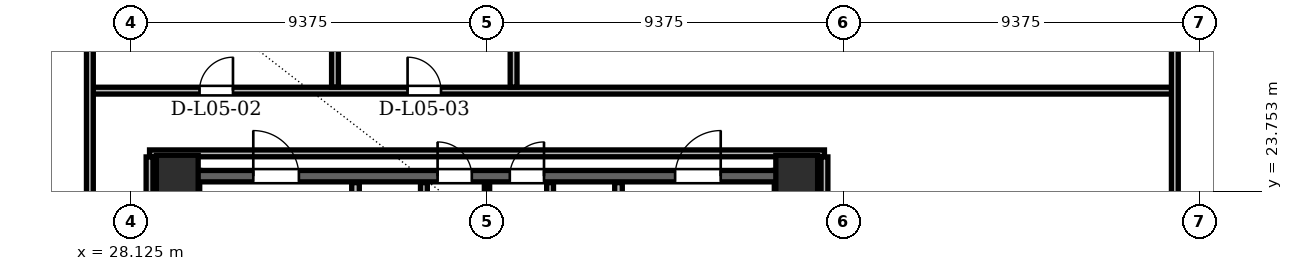
"""IFC4 building model, lengths in metres.
Left out: names, types, materials, properties, quantities, classifications, styles, units other than length and angle.
Written with IfcOpenShell. Run it as: python <this file> out.ifc"""

import sys

from ifc_helpers import new_model, si_unit, direction, frame, frame_2d, origin, origin_2d, place, context, subcontext, project, spatial, rectangle, hollow_rectangle, extrude, element, fill, save


model = new_model("IFC4")
c1 = context("Model", 3, precision=1e-05, world=origin(), true_north=direction((0.0, 1.0)))
c2 = subcontext(c1, "Body", "Model", "MODEL_VIEW")
j1 = project(units=[si_unit("LENGTHUNIT", "METRE"), si_unit("PLANEANGLEUNIT", "RADIAN")], contexts=[c1])
p1 = place(None, origin())
s1 = spatial("IfcSite", under=j1, at=p1, CompositionType="ELEMENT")
p2 = place(p1, origin())
s2 = spatial("IfcBuilding", under=s1, at=p2, CompositionType="ELEMENT")
p3 = place(p2, frame((0.0, 0.0, 22.5)))
s3 = spatial("IfcBuildingStorey", under=s2, at=p3, CompositionType="ELEMENT", Elevation=22.5)
for number, where, z_axis, x_axis in (
    (1, (45.65, 24.15, 0.0), (0.0, 0.0, 1.0), (1.0, 0.0, 0.0)),
    (2, (29.35, 24.15, 0.0), (0.0, 0.0, 1.0), (1.0, 0.0, 0.0)),
):
    element("IfcColumn", number, at=place(p3, frame(where, z_axis=z_axis, x_axis=x_axis)), inside=s3, PredefinedType="COLUMN", context=c2, shape_type="SweptSolid", body=[
        extrude(hollow_rectangle(XDim=1.1, YDim=1.1, WallThickness=0.09, at=origin_2d()), origin(), (0.0, 0.0, 1.0), 4.8),
    ])
for number, where, z_axis, x_axis in (
    (3, (29.64, 11.0, 0.0), (0.0, 0.0, 1.0), (0.0, 1.0, 0.0)),
    (4, (45.36, 11.0, 0.0), (0.0, 0.0, 1.0), (0.0, 1.0, 0.0)),
):
    element("IfcWall", number, at=place(p3, frame(where, z_axis=z_axis, x_axis=x_axis)), inside=s3, PredefinedType="SHEAR", context=c2, shape_type="SweptSolid", body=[
        extrude(rectangle(XDim=13.3, YDim=0.6, at=frame_2d((6.65, 0.0))), origin(), (0.0, 0.0, 1.0), 4.56),
    ])
p4 = place(p3, frame((29.65, 24.15, 0.0), z_axis=(0.0, 0.0, 1.0), x_axis=(1.0, 0.0, 0.0)))
e5 = element("IfcWall", 5, at=p4, inside=s3, PredefinedType="SHEAR", context=c2, shape_type="SweptSolid", body=[
    extrude(rectangle(XDim=15.7, YDim=0.3, at=frame_2d((7.85, 0.0))), origin(), (0.0, 0.0, 1.0), 4.56),
])
p5 = place(p4, frame((1.7, 0.0, 0.0)))
e6 = element("IfcOpeningElement", 6, at=p5, cuts=e5, PredefinedType="OPENING", context=c2, shape_type="SweptSolid", body=[
    extrude(rectangle(XDim=1.2, YDim=2.2, at=frame_2d((0.6, 1.1))), frame((0.0, 0.15, 0.0), z_axis=(0.0, -1.0, 0.0), x_axis=(1.0, 0.0, 0.0)), (0.0, 0.0, 1.0), 0.3),
])
p6 = place(p4, frame((12.8, 0.0, 0.0)))
e7 = element("IfcOpeningElement", 7, at=p6, cuts=e5, PredefinedType="OPENING", context=c2, shape_type="SweptSolid", body=[
    extrude(rectangle(XDim=1.2, YDim=2.2, at=frame_2d((0.6, 1.1))), frame((0.0, 0.15, 0.0), z_axis=(0.0, -1.0, 0.0), x_axis=(1.0, 0.0, 0.0)), (0.0, 0.0, 1.0), 0.3),
])
p7 = place(p4, frame((6.55, 0.0, 0.0)))
e8 = element("IfcOpeningElement", 8, at=p7, cuts=e5, PredefinedType="OPENING", context=c2, shape_type="SweptSolid", body=[
    extrude(rectangle(XDim=0.9, YDim=2.05, at=frame_2d((0.45, 1.025))), frame((0.0, 0.15, 0.0), z_axis=(0.0, -1.0, 0.0), x_axis=(1.0, 0.0, 0.0)), (0.0, 0.0, 1.0), 0.3),
])
p8 = place(p4, frame((8.45, 0.0, 0.0)))
e9 = element("IfcOpeningElement", 9, at=p8, cuts=e5, PredefinedType="OPENING", context=c2, shape_type="SweptSolid", body=[
    extrude(rectangle(XDim=0.9, YDim=2.05, at=frame_2d((0.45, 1.025))), frame((0.0, 0.15, 0.0), z_axis=(0.0, -1.0, 0.0), x_axis=(1.0, 0.0, 0.0)), (0.0, 0.0, 1.0), 0.3),
])
p9 = place(p3, frame((34.04, 19.48, 0.0), z_axis=(0.0, 0.0, 1.0), x_axis=(0.0, 1.0, 0.0)))
e10 = element("IfcWall", 10, at=p9, inside=s3, PredefinedType="PARTITIONING", context=c2, shape_type="SweptSolid", body=[
    extrude(rectangle(XDim=4.5, YDim=0.2, at=frame_2d((2.25, 0.0))), origin(), (0.0, 0.0, 1.0), 3.6),
])
p10 = place(p9, frame((2.12, 0.0, 0.0)))
e11 = element("IfcOpeningElement", 11, at=p10, cuts=e10, PredefinedType="OPENING", context=c2, shape_type="SweptSolid", body=[
    extrude(rectangle(XDim=1.1, YDim=2.2, at=frame_2d((0.55, 1.1))), frame((0.0, 0.1, 0.0), z_axis=(0.0, -1.0, 0.0), x_axis=(1.0, 0.0, 0.0)), (0.0, 0.0, 1.0), 0.2),
])
p11 = place(p3, frame((35.84, 20.96, 0.0), z_axis=(0.0, 0.0, 1.0), x_axis=(0.0, 1.0, 0.0)))
e12 = element("IfcWall", 12, at=p11, inside=s3, PredefinedType="PARTITIONING", context=c2, shape_type="SweptSolid", body=[
    extrude(rectangle(XDim=3.02, YDim=0.18, at=frame_2d((1.51, 0.0))), origin(), (0.0, 0.0, 1.0), 3.6),
])
p12 = place(p3, frame((40.96, 19.48, 0.0), z_axis=(0.0, 0.0, 1.0), x_axis=(0.0, 1.0, 0.0)))
e13 = element("IfcWall", 13, at=p12, inside=s3, PredefinedType="PARTITIONING", context=c2, shape_type="SweptSolid", body=[
    extrude(rectangle(XDim=4.5, YDim=0.2, at=frame_2d((2.25, 0.0))), origin(), (0.0, 0.0, 1.0), 3.6),
])
p13 = place(p12, frame((2.12, 0.0, 0.0)))
e14 = element("IfcOpeningElement", 14, at=p13, cuts=e13, PredefinedType="OPENING", context=c2, shape_type="SweptSolid", body=[
    extrude(rectangle(XDim=1.1, YDim=2.2, at=frame_2d((0.55, 1.1))), frame((0.0, 0.1, 0.0), z_axis=(0.0, -1.0, 0.0), x_axis=(1.0, 0.0, 0.0)), (0.0, 0.0, 1.0), 0.2),
])
p14 = place(p3, frame((39.16, 20.96, 0.0), z_axis=(0.0, 0.0, 1.0), x_axis=(0.0, 1.0, 0.0)))
e15 = element("IfcWall", 15, at=p14, inside=s3, PredefinedType="PARTITIONING", context=c2, shape_type="SweptSolid", body=[
    extrude(rectangle(XDim=3.02, YDim=0.18, at=frame_2d((1.51, 0.0))), origin(), (0.0, 0.0, 1.0), 3.6),
])
p15 = place(p3, frame((37.5, 21.06, 0.0), z_axis=(0.0, 0.0, 1.0), x_axis=(0.0, 1.0, 0.0)))
e16 = element("IfcWall", 16, at=p15, inside=s3, PredefinedType="PARTITIONING", context=c2, shape_type="SweptSolid", body=[
    extrude(rectangle(XDim=2.92, YDim=0.14, at=frame_2d((1.46, 0.0))), origin(), (0.0, 0.0, 1.0), 3.6),
])
p16 = place(p3, frame((28.62, 24.75, 0.0), z_axis=(0.0, 0.0, 1.0), x_axis=(1.0, 0.0, 0.0)))
e17 = element("IfcWall", 17, at=p16, inside=s3, PredefinedType="PARTITIONING", context=c2, shape_type="SweptSolid", body=[
    extrude(rectangle(XDim=17.76, YDim=0.18, at=frame_2d((8.88, 0.0))), origin(), (0.0, 0.0, 1.0), 3.623),
])
p17 = place(p3, frame((27.05, 26.4, 0.0), z_axis=(0.0, 0.0, 1.0), x_axis=(1.0, 0.0, 0.0)))
e18 = element("IfcWall", 18, at=p17, inside=s3, PredefinedType="PARTITIONING", context=c2, shape_type="SweptSolid", body=[
    extrude(rectangle(XDim=28.55, YDim=0.18, at=frame_2d((14.275, 0.0))), origin(), (0.0, 0.0, 1.0), 3.35),
])
p18 = place(p17, frame((2.885, 0.0, 0.0)))
e19 = element("IfcOpeningElement", 19, at=p18, cuts=e18, PredefinedType="OPENING", context=c2, shape_type="SweptSolid", body=[
    extrude(rectangle(XDim=0.88, YDim=2.08, at=frame_2d((0.44, 1.04))), frame((0.0, 0.09, 0.0), z_axis=(0.0, -1.0, 0.0), x_axis=(1.0, 0.0, 0.0)), (0.0, 0.0, 1.0), 0.18),
])
p19 = place(p17, frame((8.36, 0.0, 0.0)))
e20 = element("IfcOpeningElement", 20, at=p19, cuts=e18, PredefinedType="OPENING", context=c2, shape_type="SweptSolid", body=[
    extrude(rectangle(XDim=0.88, YDim=2.08, at=frame_2d((0.44, 1.04))), frame((0.0, 0.09, 0.0), z_axis=(0.0, -1.0, 0.0), x_axis=(1.0, 0.0, 0.0)), (0.0, 0.0, 1.0), 0.18),
])
p20 = place(p3, frame((27.05, 10.494, 0.0), z_axis=(0.0, 0.0, 1.0), x_axis=(0.0, 1.0, 0.0)))
e21 = element("IfcWall", 21, at=p20, inside=s3, PredefinedType="PARTITIONING", context=c2, shape_type="SweptSolid", body=[
    extrude(rectangle(XDim=28.386, YDim=0.18, at=frame_2d((14.193, 0.0))), origin(), (0.0, 0.0, 1.0), 3.35),
])
p21 = place(p20, frame((5.985, 0.0, 0.0)))
e22 = element("IfcOpeningElement", 22, at=p21, cuts=e21, PredefinedType="OPENING", context=c2, shape_type="SweptSolid", body=[
    extrude(rectangle(XDim=1.3, YDim=2.2, at=frame_2d((0.65, 1.1))), frame((0.0, 0.09, 0.0), z_axis=(0.0, -1.0, 0.0), x_axis=(1.0, 0.0, 0.0)), (0.0, 0.0, 1.0), 0.18),
])
p22 = place(p3, frame((28.62, 10.494, 0.0), z_axis=(0.0, 0.0, 1.0), x_axis=(0.0, 1.0, 0.0)))
e23 = element("IfcWall", 23, at=p22, inside=s3, PredefinedType="PARTITIONING", context=c2, shape_type="SweptSolid", body=[
    extrude(rectangle(XDim=14.162, YDim=0.18, at=frame_2d((7.081, 0.0))), origin(), (0.0, 0.0, 1.0), 3.623),
])
p23 = place(p3, frame((33.5, 26.494, 0.0), z_axis=(0.0, 0.0, 1.0), x_axis=(0.0, 1.0, 0.0)))
e24 = element("IfcWall", 24, at=p23, inside=s3, PredefinedType="PARTITIONING", context=c2, shape_type="SweptSolid", body=[
    extrude(rectangle(XDim=6.912, YDim=0.18, at=frame_2d((3.456, 0.0))), origin(), (0.0, 0.0, 1.0), 4.56),
])
p24 = place(p3, frame((38.2, 26.494, 0.0), z_axis=(0.0, 0.0, 1.0), x_axis=(0.0, 1.0, 0.0)))
e25 = element("IfcWall", 25, at=p24, inside=s3, PredefinedType="PARTITIONING", context=c2, shape_type="SweptSolid", body=[
    extrude(rectangle(XDim=3.612, YDim=0.18, at=frame_2d((1.806, 0.0))), origin(), (0.0, 0.0, 1.0), 4.56),
])
p25 = place(p3, frame((46.38, 10.494, 0.0), z_axis=(0.0, 0.0, 1.0), x_axis=(0.0, 1.0, 0.0)))
e26 = element("IfcWall", 26, at=p25, inside=s3, PredefinedType="PARTITIONING", context=c2, shape_type="SweptSolid", body=[
    extrude(rectangle(XDim=14.162, YDim=0.18, at=frame_2d((7.081, 0.0))), origin(), (0.0, 0.0, 1.0), 4.56),
])
p26 = place(p3, frame((55.6, 2.244, 0.0), z_axis=(0.0, 0.0, 1.0), x_axis=(0.0, 1.0, 0.0)))
e27 = element("IfcWall", 27, at=p26, inside=s3, PredefinedType="PARTITIONING", context=c2, shape_type="SweptSolid", body=[
    extrude(rectangle(XDim=41.112, YDim=0.18, at=frame_2d((20.556, 0.0))), origin(), (0.0, 0.0, 1.0), 3.35),
])
p27 = place(p26, frame((11.082, 0.0, 0.0)))
e28 = element("IfcOpeningElement", 28, at=p27, cuts=e27, PredefinedType="OPENING", context=c2, shape_type="SweptSolid", body=[
    extrude(rectangle(XDim=1.3, YDim=2.2, at=frame_2d((0.65, 1.1))), frame((0.0, 0.09, 0.0), z_axis=(0.0, -1.0, 0.0), x_axis=(1.0, 0.0, 0.0)), (0.0, 0.0, 1.0), 0.18),
])
p28 = place(p26, frame((18.132, 0.0, 0.0)))
e29 = element("IfcOpeningElement", 29, at=p28, cuts=e27, PredefinedType="OPENING", context=c2, shape_type="SweptSolid", body=[
    extrude(rectangle(XDim=1.3, YDim=2.2, at=frame_2d((0.65, 1.1))), frame((0.0, 0.09, 0.0), z_axis=(0.0, -1.0, 0.0), x_axis=(1.0, 0.0, 0.0)), (0.0, 0.0, 1.0), 0.18),
])
p29 = place(p5, origin())
e30 = element("IfcDoor", 30, at=p29, inside=s3, OperationType="SINGLE_SWING_LEFT", PredefinedType="DOOR", context=c2, shape_type="SweptSolid", body=[
    extrude(rectangle(XDim=1.2, YDim=2.2, at=frame_2d((0.6, 1.1))), frame((0.0, 0.025, 0.0), z_axis=(0.0, -1.0, 0.0), x_axis=(1.0, 0.0, 0.0)), (0.0, 0.0, 1.0), 0.05),
])
fill(e6, e30)
p30 = place(p6, origin())
e31 = element("IfcDoor", 31, at=p30, inside=s3, OperationType="SINGLE_SWING_RIGHT", PredefinedType="DOOR", context=c2, shape_type="SweptSolid", body=[
    extrude(rectangle(XDim=1.2, YDim=2.2, at=frame_2d((0.6, 1.1))), frame((0.0, 0.025, 0.0), z_axis=(0.0, -1.0, 0.0), x_axis=(1.0, 0.0, 0.0)), (0.0, 0.0, 1.0), 0.05),
])
fill(e7, e31)
p31 = place(p7, origin())
e32 = element("IfcDoor", 32, at=p31, inside=s3, OperationType="SINGLE_SWING_LEFT", PredefinedType="DOOR", context=c2, shape_type="SweptSolid", body=[
    extrude(rectangle(XDim=0.9, YDim=2.05, at=frame_2d((0.45, 1.025))), frame((0.0, 0.025, 0.0), z_axis=(0.0, -1.0, 0.0), x_axis=(1.0, 0.0, 0.0)), (0.0, 0.0, 1.0), 0.05),
])
fill(e8, e32)
p32 = place(p8, origin())
e33 = element("IfcDoor", 33, at=p32, inside=s3, OperationType="SINGLE_SWING_RIGHT", PredefinedType="DOOR", context=c2, shape_type="SweptSolid", body=[
    extrude(rectangle(XDim=0.9, YDim=2.05, at=frame_2d((0.45, 1.025))), frame((0.0, 0.025, 0.0), z_axis=(0.0, -1.0, 0.0), x_axis=(1.0, 0.0, 0.0)), (0.0, 0.0, 1.0), 0.05),
])
fill(e9, e33)
p33 = place(p18, origin())
e34 = element("IfcDoor", 34, at=p33, inside=s3, OperationType="SINGLE_SWING_RIGHT", PredefinedType="DOOR", context=c2, shape_type="SweptSolid", body=[
    extrude(rectangle(XDim=0.88, YDim=2.08, at=frame_2d((0.44, 1.04))), frame((0.0, 0.025, 0.0), z_axis=(0.0, -1.0, 0.0), x_axis=(1.0, 0.0, 0.0)), (0.0, 0.0, 1.0), 0.05),
])
fill(e19, e34)
p34 = place(p19, origin())
e35 = element("IfcDoor", 35, at=p34, inside=s3, OperationType="SINGLE_SWING_LEFT", PredefinedType="DOOR", context=c2, shape_type="SweptSolid", body=[
    extrude(rectangle(XDim=0.88, YDim=2.08, at=frame_2d((0.44, 1.04))), frame((0.0, 0.025, 0.0), z_axis=(0.0, -1.0, 0.0), x_axis=(1.0, 0.0, 0.0)), (0.0, 0.0, 1.0), 0.05),
])
fill(e20, e35)
save(model, sys.argv[1])
